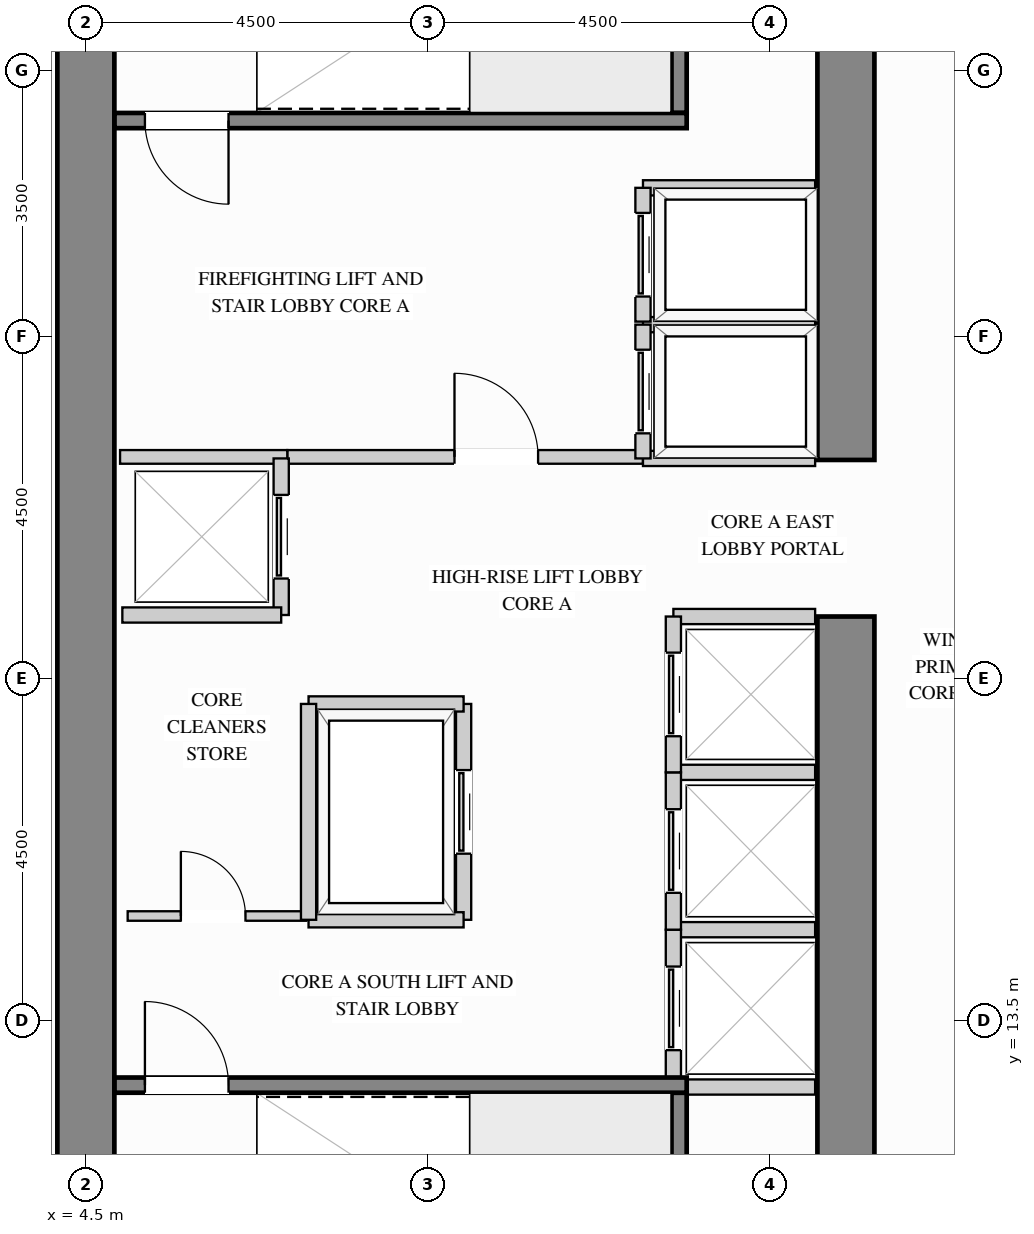
"""IFC4 building model, lengths in metres.
Left out: names, types, materials, properties, quantities, classifications, styles, units other than length and angle.
Written with IfcOpenShell. Run it as: python <this file> out.ifc"""

import sys

from ifc_helpers import new_model, si_unit, direction, frame, frame_2d, origin, place, context, subcontext, project, spatial, rectangle, extrude, source, transform, mapped, element, fill, save


model = new_model("IFC4")
c1 = context("Model", 3, precision=1e-05, world=origin(), true_north=direction((0.0, 1.0)))
c2 = subcontext(c1, "Body", "Model", "MODEL_VIEW")
j1 = project(units=[si_unit("LENGTHUNIT", "METRE"), si_unit("PLANEANGLEUNIT", "RADIAN")], contexts=[c1])
p1 = place(None, origin())
s1 = spatial("IfcSite", under=j1, at=p1, CompositionType="ELEMENT")
p2 = place(p1, origin())
s2 = spatial("IfcBuilding", under=s1, at=p2, CompositionType="ELEMENT")
p3 = place(p2, frame((0.0, 0.0, 81.0)))
s3 = spatial("IfcBuildingStorey", under=s2, at=p3, CompositionType="ELEMENT", Elevation=81.0)
m1 = source(origin(), c2, "Body", "SweptSolid", [
    extrude(rectangle(XDim=9.945, YDim=0.75, at=frame_2d((4.973, 0.0))), origin(), (0.0, 0.0, 1.0), 3.38),
])
p4 = place(p3, frame((14.5, 8.875, 0.0), z_axis=(0.0, 0.0, 1.0), x_axis=(0.0, 1.0, 0.0)))
e1 = element("IfcWall", 1, at=p4, inside=s3, PredefinedType="SHEAR", context=c2, shape_type="MappedRepresentation", body=[
    mapped(m1, transform((0.0, 0.0, 0.0), x_axis=(1.0, 0.0, 0.0), y_axis=(0.0, 1.0, 0.0), z_axis=(0.0, 0.0, 1.0))),
])
m2 = source(origin(), c2, "Body", "SweptSolid", [
    extrude(rectangle(XDim=8.245, YDim=0.75, at=frame_2d((4.123, 0.0))), origin(), (0.0, 0.0, 1.0), 3.38),
])
p5 = place(p3, frame((14.5, 20.88, 0.0), z_axis=(0.0, 0.0, 1.0), x_axis=(0.0, 1.0, 0.0)))
e2 = element("IfcWall", 2, at=p5, inside=s3, PredefinedType="SHEAR", context=c2, shape_type="MappedRepresentation", body=[
    mapped(m2, transform((0.0, 0.0, 0.0), x_axis=(1.0, 0.0, 0.0), y_axis=(0.0, 1.0, 0.0), z_axis=(0.0, 0.0, 1.0))),
])
m3 = source(origin(), c2, "Body", "SweptSolid", [
    extrude(rectangle(XDim=20.25, YDim=0.75, at=frame_2d((10.125, 0.0))), origin(), (0.0, 0.0, 1.0), 3.38),
])
p6 = place(p3, frame((4.5, 8.875, 0.0), z_axis=(0.0, 0.0, 1.0), x_axis=(0.0, 1.0, 0.0)))
e3 = element("IfcWall", 3, at=p6, inside=s3, PredefinedType="SHEAR", context=c2, shape_type="MappedRepresentation", body=[
    mapped(m3, transform((0.0, 0.0, 0.0), x_axis=(1.0, 0.0, 0.0), y_axis=(0.0, 1.0, 0.0), z_axis=(0.0, 0.0, 1.0))),
])
p7 = place(p3, frame((7.15, 20.92, 0.0), z_axis=(0.0, 0.0, 1.0), x_axis=(1.0, 0.0, 0.0)))
e4 = element("IfcWall", 4, at=p7, inside=s3, PredefinedType="PARTITIONING", context=c2, shape_type="SweptSolid", body=[
    extrude(rectangle(XDim=4.68, YDim=0.18, at=frame_2d((2.34, 0.0))), origin(), (0.0, 0.0, 1.0), 3.365),
])
p8 = place(p7, frame((2.2, 0.0, 0.0)))
e5 = element("IfcOpeningElement", 5, at=p8, cuts=e4, PredefinedType="OPENING", context=c2, shape_type="SweptSolid", body=[
    extrude(rectangle(XDim=1.1, YDim=2.15, at=frame_2d((0.55, 1.075))), frame((0.0, 0.1, 0.0), z_axis=(0.0, -1.0, 0.0), x_axis=(1.0, 0.0, 0.0)), (0.0, 0.0, 1.0), 0.2),
])
m4 = source(origin(), c2, "Body", "SweptSolid", [
    extrude(rectangle(XDim=2.2, YDim=0.18, at=frame_2d((1.1, 0.0))), origin(), (0.0, 0.0, 1.0), 3.365),
])
p9 = place(p3, frame((4.95, 20.92, 0.0), z_axis=(0.0, 0.0, 1.0), x_axis=(1.0, 0.0, 0.0)))
e6 = element("IfcWall", 6, at=p9, inside=s3, PredefinedType="PARTITIONING", context=c2, shape_type="MappedRepresentation", body=[
    mapped(m4, transform((0.0, 0.0, 0.0), x_axis=(1.0, 0.0, 0.0), y_axis=(0.0, 1.0, 0.0), z_axis=(0.0, 0.0, 1.0))),
])
p10 = place(p3, frame((5.05, 14.88, 0.0), z_axis=(0.0, 0.0, 1.0), x_axis=(1.0, 0.0, 0.0)))
e7 = element("IfcWall", 7, at=p10, inside=s3, PredefinedType="PARTITIONING", context=c2, shape_type="SweptSolid", body=[
    extrude(rectangle(XDim=2.35, YDim=0.125, at=frame_2d((1.175, 0.0))), origin(), (0.0, 0.0, 1.0), 3.365),
])
p11 = place(p10, frame((0.7, 0.0, 0.0)))
e8 = element("IfcOpeningElement", 8, at=p11, cuts=e7, PredefinedType="OPENING", context=c2, shape_type="SweptSolid", body=[
    extrude(rectangle(XDim=0.85, YDim=2.1, at=frame_2d((0.425, 1.05))), frame((0.0, 0.073, 0.0), z_axis=(0.0, -1.0, 0.0), x_axis=(1.0, 0.0, 0.0)), (0.0, 0.0, 1.0), 0.145),
])
m5 = source(origin(), c2, "Body", "SweptSolid", [
    extrude(rectangle(XDim=2.265, YDim=0.2, at=frame_2d((1.132, 0.0))), origin(), (0.0, 0.0, 1.0), 3.365),
])
for number, where, z_axis, x_axis in (
    (9, (11.83, 22.66, 0.0), (0.0, 0.0, 1.0), (1.0, 0.0, 0.0)),
    (10, (11.83, 20.9, 0.0), (0.0, 0.0, 1.0), (1.0, 0.0, 0.0)),
):
    element("IfcWall", number, at=place(p3, frame(where, z_axis=z_axis, x_axis=x_axis)), inside=s3, PredefinedType="PARTITIONING", context=c2, shape_type="MappedRepresentation", body=[
        mapped(m5, transform((0.0, 0.0, 0.0), x_axis=(1.0, 0.0, 0.0), y_axis=(0.0, 1.0, 0.0), z_axis=(0.0, 0.0, 1.0))),
    ])
p12 = place(p3, frame((11.83, 20.9, 0.0), z_axis=(0.0, 0.0, 1.0), x_axis=(0.0, 1.0, 0.0)))
e11 = element("IfcWall", 11, at=p12, inside=s3, PredefinedType="PARTITIONING", context=c2, shape_type="SweptSolid", body=[
    extrude(rectangle(XDim=1.76, YDim=0.2, at=frame_2d((0.88, 0.0))), origin(), (0.0, 0.0, 1.0), 3.365),
])
p13 = place(p12, frame((0.33, 0.0, 0.0)))
e12 = element("IfcOpeningElement", 12, at=p13, cuts=e11, PredefinedType="OPENING", context=c2, shape_type="SweptSolid", body=[
    extrude(rectangle(XDim=1.1, YDim=2.2, at=frame_2d((0.55, 1.1))), frame((0.0, 0.11, 0.0), z_axis=(0.0, -1.0, 0.0), x_axis=(1.0, 0.0, 0.0)), (0.0, 0.0, 1.0), 0.22),
])
p14 = place(p3, frame((11.83, 24.46, 0.0), z_axis=(0.0, 0.0, 1.0), x_axis=(1.0, 0.0, 0.0)))
e13 = element("IfcWall", 13, at=p14, inside=s3, PredefinedType="PARTITIONING", context=c2, shape_type="MappedRepresentation", body=[
    mapped(m5, transform((0.0, 0.0, 0.0), x_axis=(1.0, 0.0, 0.0), y_axis=(0.0, 1.0, 0.0), z_axis=(0.0, 0.0, 1.0))),
])
p15 = place(p3, frame((11.83, 22.7, 0.0), z_axis=(0.0, 0.0, 1.0), x_axis=(0.0, 1.0, 0.0)))
e14 = element("IfcWall", 14, at=p15, inside=s3, PredefinedType="PARTITIONING", context=c2, shape_type="SweptSolid", body=[
    extrude(rectangle(XDim=1.76, YDim=0.2, at=frame_2d((0.88, 0.0))), origin(), (0.0, 0.0, 1.0), 3.365),
])
p16 = place(p15, frame((0.33, 0.0, 0.0)))
e15 = element("IfcOpeningElement", 15, at=p16, cuts=e14, PredefinedType="OPENING", context=c2, shape_type="SweptSolid", body=[
    extrude(rectangle(XDim=1.1, YDim=2.2, at=frame_2d((0.55, 1.1))), frame((0.0, 0.11, 0.0), z_axis=(0.0, -1.0, 0.0), x_axis=(1.0, 0.0, 0.0)), (0.0, 0.0, 1.0), 0.22),
])
m6 = source(origin(), c2, "Body", "SweptSolid", [
    extrude(rectangle(XDim=1.865, YDim=0.2, at=frame_2d((0.933, 0.0))), origin(), (0.0, 0.0, 1.0), 3.365),
])
for number, where, z_axis, x_axis in (
    (16, (12.23, 14.7, 0.0), (0.0, 0.0, 1.0), (1.0, 0.0, 0.0)),
    (17, (12.23, 12.63, 0.0), (0.0, 0.0, 1.0), (1.0, 0.0, 0.0)),
):
    element("IfcWall", number, at=place(p3, frame(where, z_axis=z_axis, x_axis=x_axis)), inside=s3, PredefinedType="PARTITIONING", context=c2, shape_type="MappedRepresentation", body=[
        mapped(m6, transform((0.0, 0.0, 0.0), x_axis=(1.0, 0.0, 0.0), y_axis=(0.0, 1.0, 0.0), z_axis=(0.0, 0.0, 1.0))),
    ])
p17 = place(p3, frame((12.23, 12.63, 0.0), z_axis=(0.0, 0.0, 1.0), x_axis=(0.0, 1.0, 0.0)))
e18 = element("IfcWall", 18, at=p17, inside=s3, PredefinedType="PARTITIONING", context=c2, shape_type="SweptSolid", body=[
    extrude(rectangle(XDim=2.07, YDim=0.2, at=frame_2d((1.035, 0.0))), origin(), (0.0, 0.0, 1.0), 3.365),
])
p18 = place(p17, frame((0.485, 0.0, 0.0)))
e19 = element("IfcOpeningElement", 19, at=p18, cuts=e18, PredefinedType="OPENING", context=c2, shape_type="SweptSolid", body=[
    extrude(rectangle(XDim=1.1, YDim=2.2, at=frame_2d((0.55, 1.1))), frame((0.0, 0.11, 0.0), z_axis=(0.0, -1.0, 0.0), x_axis=(1.0, 0.0, 0.0)), (0.0, 0.0, 1.0), 0.22),
])
p19 = place(p3, frame((12.23, 16.77, 0.0), z_axis=(0.0, 0.0, 1.0), x_axis=(1.0, 0.0, 0.0)))
e20 = element("IfcWall", 20, at=p19, inside=s3, PredefinedType="PARTITIONING", context=c2, shape_type="MappedRepresentation", body=[
    mapped(m6, transform((0.0, 0.0, 0.0), x_axis=(1.0, 0.0, 0.0), y_axis=(0.0, 1.0, 0.0), z_axis=(0.0, 0.0, 1.0))),
])
p20 = place(p3, frame((12.23, 14.7, 0.0), z_axis=(0.0, 0.0, 1.0), x_axis=(0.0, 1.0, 0.0)))
e21 = element("IfcWall", 21, at=p20, inside=s3, PredefinedType="PARTITIONING", context=c2, shape_type="SweptSolid", body=[
    extrude(rectangle(XDim=2.07, YDim=0.2, at=frame_2d((1.035, 0.0))), origin(), (0.0, 0.0, 1.0), 3.365),
])
p21 = place(p20, frame((0.485, 0.0, 0.0)))
e22 = element("IfcOpeningElement", 22, at=p21, cuts=e21, PredefinedType="OPENING", context=c2, shape_type="SweptSolid", body=[
    extrude(rectangle(XDim=1.1, YDim=2.2, at=frame_2d((0.55, 1.1))), frame((0.0, 0.11, 0.0), z_axis=(0.0, -1.0, 0.0), x_axis=(1.0, 0.0, 0.0)), (0.0, 0.0, 1.0), 0.22),
])
p22 = place(p3, frame((12.23, 18.82, 0.0), z_axis=(0.0, 0.0, 1.0), x_axis=(1.0, 0.0, 0.0)))
e23 = element("IfcWall", 23, at=p22, inside=s3, PredefinedType="PARTITIONING", context=c2, shape_type="MappedRepresentation", body=[
    mapped(m6, transform((0.0, 0.0, 0.0), x_axis=(1.0, 0.0, 0.0), y_axis=(0.0, 1.0, 0.0), z_axis=(0.0, 0.0, 1.0))),
])
p23 = place(p3, frame((12.23, 16.77, 0.0), z_axis=(0.0, 0.0, 1.0), x_axis=(0.0, 1.0, 0.0)))
e24 = element("IfcWall", 24, at=p23, inside=s3, PredefinedType="PARTITIONING", context=c2, shape_type="SweptSolid", body=[
    extrude(rectangle(XDim=2.05, YDim=0.2, at=frame_2d((1.025, 0.0))), origin(), (0.0, 0.0, 1.0), 3.365),
])
p24 = place(p23, frame((0.475, 0.0, 0.0)))
e25 = element("IfcOpeningElement", 25, at=p24, cuts=e24, PredefinedType="OPENING", context=c2, shape_type="SweptSolid", body=[
    extrude(rectangle(XDim=1.1, YDim=2.2, at=frame_2d((0.55, 1.1))), frame((0.0, 0.11, 0.0), z_axis=(0.0, -1.0, 0.0), x_axis=(1.0, 0.0, 0.0)), (0.0, 0.0, 1.0), 0.22),
])
p25 = place(p3, frame((7.07, 18.84, 0.0), z_axis=(0.0, 0.0, 1.0), x_axis=(0.0, 1.0, 0.0)))
e26 = element("IfcWall", 26, at=p25, inside=s3, PredefinedType="PARTITIONING", context=c2, shape_type="SweptSolid", body=[
    extrude(rectangle(XDim=2.06, YDim=0.2, at=frame_2d((1.03, 0.0))), origin(), (0.0, 0.0, 1.0), 3.365),
])
p26 = place(p25, frame((0.48, 0.0, 0.0)))
e27 = element("IfcOpeningElement", 27, at=p26, cuts=e26, PredefinedType="OPENING", context=c2, shape_type="SweptSolid", body=[
    extrude(rectangle(XDim=1.1, YDim=2.2, at=frame_2d((0.55, 1.1))), frame((0.0, 0.11, 0.0), z_axis=(0.0, -1.0, 0.0), x_axis=(1.0, 0.0, 0.0)), (0.0, 0.0, 1.0), 0.22),
])
m7 = source(origin(), c2, "Body", "SweptSolid", [
    extrude(rectangle(XDim=2.09, YDim=0.2, at=frame_2d((1.045, 0.0))), origin(), (0.0, 0.0, 1.0), 3.365),
])
p27 = place(p3, frame((4.98, 18.84, 0.0), z_axis=(0.0, 0.0, 1.0), x_axis=(1.0, 0.0, 0.0)))
e28 = element("IfcWall", 28, at=p27, inside=s3, PredefinedType="PARTITIONING", context=c2, shape_type="MappedRepresentation", body=[
    mapped(m7, transform((0.0, 0.0, 0.0), x_axis=(1.0, 0.0, 0.0), y_axis=(0.0, 1.0, 0.0), z_axis=(0.0, 0.0, 1.0))),
])
p28 = place(p3, frame((9.47, 14.83, 0.0), z_axis=(0.0, 0.0, 1.0), x_axis=(0.0, 1.0, 0.0)))
e29 = element("IfcWall", 29, at=p28, inside=s3, PredefinedType="PARTITIONING", context=c2, shape_type="SweptSolid", body=[
    extrude(rectangle(XDim=2.84, YDim=0.2, at=frame_2d((1.42, 0.0))), origin(), (0.0, 0.0, 1.0), 3.365),
])
p29 = place(p28, frame((0.87, 0.0, 0.0)))
e30 = element("IfcOpeningElement", 30, at=p29, cuts=e29, PredefinedType="OPENING", context=c2, shape_type="SweptSolid", body=[
    extrude(rectangle(XDim=1.1, YDim=2.2, at=frame_2d((0.55, 1.1))), frame((0.0, 0.11, 0.0), z_axis=(0.0, -1.0, 0.0), x_axis=(1.0, 0.0, 0.0)), (0.0, 0.0, 1.0), 0.22),
])
m8 = source(origin(), c2, "Body", "SweptSolid", [
    extrude(rectangle(XDim=2.04, YDim=0.2, at=frame_2d((1.02, 0.0))), origin(), (0.0, 0.0, 1.0), 3.365),
])
for number, where, z_axis, x_axis in (
    (31, (7.43, 17.67, 0.0), (0.0, 0.0, 1.0), (1.0, 0.0, 0.0)),
    (32, (7.43, 14.83, 0.0), (0.0, 0.0, 1.0), (1.0, 0.0, 0.0)),
):
    element("IfcWall", number, at=place(p3, frame(where, z_axis=z_axis, x_axis=x_axis)), inside=s3, PredefinedType="PARTITIONING", context=c2, shape_type="MappedRepresentation", body=[
        mapped(m8, transform((0.0, 0.0, 0.0), x_axis=(1.0, 0.0, 0.0), y_axis=(0.0, 1.0, 0.0), z_axis=(0.0, 0.0, 1.0))),
    ])
m9 = source(origin(), c2, "Body", "SweptSolid", [
    extrude(rectangle(XDim=2.84, YDim=0.2, at=frame_2d((1.42, 0.0))), origin(), (0.0, 0.0, 1.0), 3.365),
])
p30 = place(p3, frame((7.43, 14.83, 0.0), z_axis=(0.0, 0.0, 1.0), x_axis=(0.0, 1.0, 0.0)))
e33 = element("IfcWall", 33, at=p30, inside=s3, PredefinedType="PARTITIONING", context=c2, shape_type="MappedRepresentation", body=[
    mapped(m9, transform((0.0, 0.0, 0.0), x_axis=(1.0, 0.0, 0.0), y_axis=(0.0, 1.0, 0.0), z_axis=(0.0, 0.0, 1.0))),
])
m10 = source(origin(), c2, "Body", "SweptSolid", [
    extrude(rectangle(XDim=3.678, YDim=0.2, at=frame_2d((1.839, 0.0))), origin(), (0.0, 0.0, 1.0), 3.38),
])
p31 = place(p3, frame((12.305, 8.877, 0.0), z_axis=(0.0, 0.0, 1.0), x_axis=(0.0, 1.0, 0.0)))
e34 = element("IfcWall", 34, at=p31, inside=s3, PredefinedType="SHEAR", context=c2, shape_type="MappedRepresentation", body=[
    mapped(m10, transform((0.0, 0.0, 0.0), x_axis=(1.0, 0.0, 0.0), y_axis=(0.0, 1.0, 0.0), z_axis=(0.0, 0.0, 1.0))),
])
p32 = place(p3, frame((4.877, 12.655, 0.0), z_axis=(0.0, 0.0, 1.0), x_axis=(1.0, 0.0, 0.0)))
e35 = element("IfcWall", 35, at=p32, inside=s3, PredefinedType="SHEAR", context=c2, shape_type="SweptSolid", body=[
    extrude(rectangle(XDim=7.528, YDim=0.2, at=frame_2d((3.764, 0.0))), origin(), (0.0, 0.0, 1.0), 3.38),
])
p33 = place(p32, frame((0.4, 0.0, 0.0)))
e36 = element("IfcOpeningElement", 36, at=p33, cuts=e35, PredefinedType="OPENING", context=c2, shape_type="SweptSolid", body=[
    extrude(rectangle(XDim=1.1, YDim=2.15, at=frame_2d((0.55, 1.075))), frame((0.0, 0.11, 0.0), z_axis=(0.0, -1.0, 0.0), x_axis=(1.0, 0.0, 0.0)), (0.0, 0.0, 1.0), 0.22),
])
p34 = place(p3, frame((12.305, 25.445, 0.0), z_axis=(0.0, 0.0, 1.0), x_axis=(0.0, 1.0, 0.0)))
e37 = element("IfcWall", 37, at=p34, inside=s3, PredefinedType="SHEAR", context=c2, shape_type="MappedRepresentation", body=[
    mapped(m10, transform((0.0, 0.0, 0.0), x_axis=(1.0, 0.0, 0.0), y_axis=(0.0, 1.0, 0.0), z_axis=(0.0, 0.0, 1.0))),
])
p35 = place(p3, frame((4.877, 25.345, 0.0), z_axis=(0.0, 0.0, 1.0), x_axis=(1.0, 0.0, 0.0)))
e38 = element("IfcWall", 38, at=p35, inside=s3, PredefinedType="SHEAR", context=c2, shape_type="SweptSolid", body=[
    extrude(rectangle(XDim=7.528, YDim=0.2, at=frame_2d((3.764, 0.0))), origin(), (0.0, 0.0, 1.0), 3.38),
])
p36 = place(p35, frame((0.4, 0.0, 0.0)))
e39 = element("IfcOpeningElement", 39, at=p36, cuts=e38, PredefinedType="OPENING", context=c2, shape_type="SweptSolid", body=[
    extrude(rectangle(XDim=1.1, YDim=2.15, at=frame_2d((0.55, 1.075))), frame((0.0, 0.11, 0.0), z_axis=(0.0, -1.0, 0.0), x_axis=(1.0, 0.0, 0.0)), (0.0, 0.0, 1.0), 0.22),
])
m11 = source(origin(), c2, "Body", "SweptSolid", [
    extrude(rectangle(XDim=1.1, YDim=2.15, at=frame_2d((0.55, 1.075))), frame((0.0, 0.025, 0.0), z_axis=(0.0, -1.0, 0.0), x_axis=(1.0, 0.0, 0.0)), (0.0, 0.0, 1.0), 0.05),
])
p37 = place(p8, origin())
e40 = element("IfcDoor", 40, at=p37, inside=s3, OperationType="SINGLE_SWING_LEFT", PredefinedType="DOOR", context=c2, shape_type="MappedRepresentation", body=[
    mapped(m11, transform((0.0, 0.0, 0.0), x_axis=(1.0, 0.0, 0.0), y_axis=(0.0, 1.0, 0.0), z_axis=(0.0, 0.0, 1.0))),
])
fill(e5, e40)
m12 = source(origin(), c2, "Body", "SweptSolid", [
    extrude(rectangle(XDim=1.1, YDim=2.2, at=frame_2d((0.55, 1.1))), frame((0.0, 0.025, 0.0), z_axis=(0.0, -1.0, 0.0), x_axis=(1.0, 0.0, 0.0)), (0.0, 0.0, 1.0), 0.05),
])
p38 = place(p13, origin())
e41 = element("IfcDoor", 41, at=p38, inside=s3, OperationType="SLIDING_TO_LEFT", PredefinedType="DOOR", context=c2, shape_type="MappedRepresentation", body=[
    mapped(m12, transform((0.0, 0.0, 0.0), x_axis=(1.0, 0.0, 0.0), y_axis=(0.0, 1.0, 0.0), z_axis=(0.0, 0.0, 1.0))),
])
fill(e12, e41)
p39 = place(p16, origin())
e42 = element("IfcDoor", 42, at=p39, inside=s3, OperationType="SLIDING_TO_LEFT", PredefinedType="DOOR", context=c2, shape_type="MappedRepresentation", body=[
    mapped(m12, transform((0.0, 0.0, 0.0), x_axis=(1.0, 0.0, 0.0), y_axis=(0.0, 1.0, 0.0), z_axis=(0.0, 0.0, 1.0))),
])
fill(e15, e42)
p40 = place(p18, origin())
e43 = element("IfcDoor", 43, at=p40, inside=s3, OperationType="SLIDING_TO_LEFT", PredefinedType="DOOR", context=c2, shape_type="MappedRepresentation", body=[
    mapped(m12, transform((0.0, 0.0, 0.0), x_axis=(1.0, 0.0, 0.0), y_axis=(0.0, 1.0, 0.0), z_axis=(0.0, 0.0, 1.0))),
])
fill(e19, e43)
p41 = place(p21, origin())
e44 = element("IfcDoor", 44, at=p41, inside=s3, OperationType="SLIDING_TO_LEFT", PredefinedType="DOOR", context=c2, shape_type="MappedRepresentation", body=[
    mapped(m12, transform((0.0, 0.0, 0.0), x_axis=(1.0, 0.0, 0.0), y_axis=(0.0, 1.0, 0.0), z_axis=(0.0, 0.0, 1.0))),
])
fill(e22, e44)
p42 = place(p24, origin())
e45 = element("IfcDoor", 45, at=p42, inside=s3, OperationType="SLIDING_TO_LEFT", PredefinedType="DOOR", context=c2, shape_type="MappedRepresentation", body=[
    mapped(m12, transform((0.0, 0.0, 0.0), x_axis=(1.0, 0.0, 0.0), y_axis=(0.0, 1.0, 0.0), z_axis=(0.0, 0.0, 1.0))),
])
fill(e25, e45)
p43 = place(p26, origin())
e46 = element("IfcDoor", 46, at=p43, inside=s3, OperationType="SLIDING_TO_LEFT", PredefinedType="DOOR", context=c2, shape_type="MappedRepresentation", body=[
    mapped(m12, transform((0.0, 0.0, 0.0), x_axis=(1.0, 0.0, 0.0), y_axis=(0.0, 1.0, 0.0), z_axis=(0.0, 0.0, 1.0))),
])
fill(e27, e46)
p44 = place(p29, origin())
e47 = element("IfcDoor", 47, at=p44, inside=s3, OperationType="SLIDING_TO_LEFT", PredefinedType="DOOR", context=c2, shape_type="MappedRepresentation", body=[
    mapped(m12, transform((0.0, 0.0, 0.0), x_axis=(1.0, 0.0, 0.0), y_axis=(0.0, 1.0, 0.0), z_axis=(0.0, 0.0, 1.0))),
])
fill(e30, e47)
m13 = source(origin(), c2, "Body", "SweptSolid", [
    extrude(rectangle(XDim=0.85, YDim=2.1, at=frame_2d((0.425, 1.05))), frame((0.0, 0.025, 0.0), z_axis=(0.0, -1.0, 0.0), x_axis=(1.0, 0.0, 0.0)), (0.0, 0.0, 1.0), 0.05),
])
p45 = place(p11, origin())
e48 = element("IfcDoor", 48, at=p45, inside=s3, OperationType="SINGLE_SWING_LEFT", PredefinedType="DOOR", context=c2, shape_type="MappedRepresentation", body=[
    mapped(m13, transform((0.0, 0.0, 0.0), x_axis=(1.0, 0.0, 0.0), y_axis=(0.0, 1.0, 0.0), z_axis=(0.0, 0.0, 1.0))),
])
fill(e8, e48)
m14 = source(origin(), c2, "Body", "SweptSolid", [
    extrude(rectangle(XDim=1.1, YDim=2.15, at=frame_2d((0.55, 1.075))), frame((0.0, 0.025, 0.0), z_axis=(0.0, -1.0, 0.0), x_axis=(1.0, 0.0, 0.0)), (0.0, 0.0, 1.0), 0.05),
])
p46 = place(p33, origin())
e49 = element("IfcDoor", 49, at=p46, inside=s3, OperationType="SINGLE_SWING_LEFT", PredefinedType="DOOR", context=c2, shape_type="MappedRepresentation", body=[
    mapped(m14, transform((0.0, 0.0, 0.0), x_axis=(1.0, 0.0, 0.0), y_axis=(0.0, 1.0, 0.0), z_axis=(0.0, 0.0, 1.0))),
])
fill(e36, e49)
p47 = place(p36, origin())
e50 = element("IfcDoor", 50, at=p47, inside=s3, OperationType="SINGLE_SWING_RIGHT", PredefinedType="DOOR", context=c2, shape_type="MappedRepresentation", body=[
    mapped(m14, transform((0.0, 0.0, 0.0), x_axis=(1.0, 0.0, 0.0), y_axis=(0.0, 1.0, 0.0), z_axis=(0.0, 0.0, 1.0))),
])
fill(e39, e50)
save(model, sys.argv[1])
